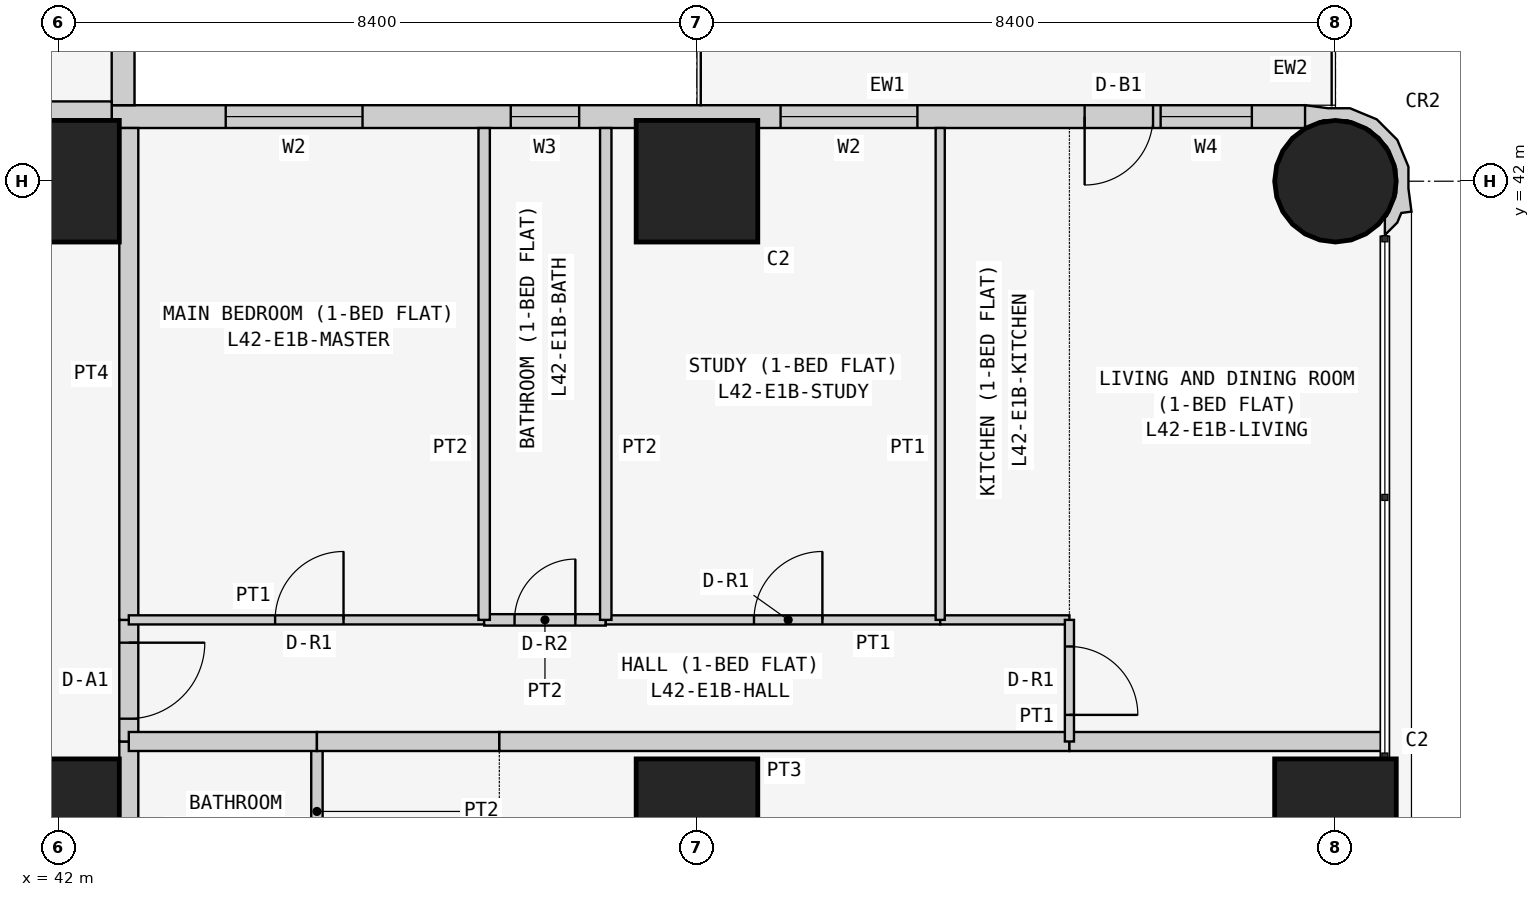
"""IFC4 building model, lengths in metres.
Left out: names, types, materials, properties, quantities, classifications, styles, units other than length and angle.
Written with IfcOpenShell. Run it as: python <this file> out.ifc"""

import sys

from ifc_helpers import new_model, si_unit, direction, frame, frame_2d, origin, origin_2d, place, context, subcontext, project, spatial, polyline, rectangle, circle, outline, extrude, element, fill, save


model = new_model("IFC4")
c1 = context("Model", 3, precision=1e-05, world=origin(), true_north=direction((0.0, 1.0)))
c2 = subcontext(c1, "Body", "Model", "MODEL_VIEW")
j1 = project(units=[si_unit("LENGTHUNIT", "METRE"), si_unit("PLANEANGLEUNIT", "RADIAN")], contexts=[c1])
p1 = place(None, origin())
s1 = spatial("IfcSite", under=j1, at=p1, CompositionType="ELEMENT")
p2 = place(p1, origin())
s2 = spatial("IfcBuilding", under=s1, at=p2, CompositionType="ELEMENT")
p3 = place(p2, frame((0.0, 0.0, 162.9)))
s3 = spatial("IfcBuildingStorey", under=s2, at=p3, CompositionType="ELEMENT", Elevation=162.9)
for number, where, z_axis, x_axis in (
    (1, (42.0, 33.6, 0.0), (0.0, 0.0, 1.0), (1.0, 0.0, 0.0)),
    (2, (42.0, 42.0, 0.0), (0.0, 0.0, 1.0), (1.0, 0.0, 0.0)),
    (3, (50.4, 33.6, 0.0), (0.0, 0.0, 1.0), (1.0, 0.0, 0.0)),
    (4, (50.4, 42.0, 0.0), (0.0, 0.0, 1.0), (1.0, 0.0, 0.0)),
    (5, (58.8, 33.6, 0.0), (0.0, 0.0, 1.0), (1.0, 0.0, 0.0)),
):
    element("IfcColumn", number, at=place(p3, frame(where, z_axis=z_axis, x_axis=x_axis)), inside=s3, PredefinedType="COLUMN", context=c2, shape_type="SweptSolid", body=[
        extrude(rectangle(XDim=1.6, YDim=1.6, at=origin_2d()), origin(), (0.0, 0.0, 1.0), 3.6),
    ])
p4 = place(p3, frame((58.8, 42.0, 0.0), z_axis=(0.0, 0.0, 1.0), x_axis=(1.0, 0.0, 0.0)))
e6 = element("IfcColumn", 6, at=p4, inside=s3, PredefinedType="COLUMN", context=c2, shape_type="SweptSolid", body=[
    extrude(circle(Radius=0.8, at=origin_2d()), origin(), (0.0, 0.0, 1.0), 3.6),
])
p5 = place(p3, frame((58.4, 42.85, 0.0), z_axis=(0.0, 0.0, 1.0), x_axis=(-1.0, 0.0, 0.0)))
e7 = element("IfcWall", 7, at=p5, inside=s3, PredefinedType="SOLIDWALL", context=c2, shape_type="SweptSolid", body=[
    extrude(rectangle(XDim=15.7, YDim=0.3, at=frame_2d((7.85, 0.0))), origin(), (0.0, 0.0, 1.0), 3.45),
])
p6 = place(p5, frame((12.4, 0.0, 0.9)))
e8 = element("IfcOpeningElement", 8, at=p6, cuts=e7, PredefinedType="OPENING", context=c2, shape_type="SweptSolid", body=[
    extrude(rectangle(XDim=1.8, YDim=1.5, at=frame_2d((0.9, 0.75))), frame((0.0, 0.16, 0.0), z_axis=(0.0, -1.0, 0.0), x_axis=(1.0, 0.0, 0.0)), (0.0, 0.0, 1.0), 0.32),
])
p7 = place(p5, frame((9.55, 0.0, 1.5)))
e9 = element("IfcOpeningElement", 9, at=p7, cuts=e7, PredefinedType="OPENING", context=c2, shape_type="SweptSolid", body=[
    extrude(rectangle(XDim=0.9, YDim=0.7, at=frame_2d((0.45, 0.35))), frame((0.0, 0.16, 0.0), z_axis=(0.0, -1.0, 0.0), x_axis=(1.0, 0.0, 0.0)), (0.0, 0.0, 1.0), 0.32),
])
p8 = place(p5, frame((5.1, 0.0, 0.9)))
e10 = element("IfcOpeningElement", 10, at=p8, cuts=e7, PredefinedType="OPENING", context=c2, shape_type="SweptSolid", body=[
    extrude(rectangle(XDim=1.8, YDim=1.5, at=frame_2d((0.9, 0.75))), frame((0.0, 0.16, 0.0), z_axis=(0.0, -1.0, 0.0), x_axis=(1.0, 0.0, 0.0)), (0.0, 0.0, 1.0), 0.32),
])
p9 = place(p5, frame((2.0, 0.0, 0.0)))
e11 = element("IfcOpeningElement", 11, at=p9, cuts=e7, PredefinedType="OPENING", context=c2, shape_type="SweptSolid", body=[
    extrude(rectangle(XDim=0.9, YDim=2.4, at=frame_2d((0.45, 1.2))), frame((0.0, 0.16, 0.0), z_axis=(0.0, -1.0, 0.0), x_axis=(1.0, 0.0, 0.0)), (0.0, 0.0, 1.0), 0.32),
])
p10 = place(p5, frame((0.7, 0.0, 0.9)))
e12 = element("IfcOpeningElement", 12, at=p10, cuts=e7, PredefinedType="OPENING", context=c2, shape_type="SweptSolid", body=[
    extrude(rectangle(XDim=1.2, YDim=1.5, at=frame_2d((0.6, 0.75))), frame((0.0, 0.16, 0.0), z_axis=(0.0, -1.0, 0.0), x_axis=(1.0, 0.0, 0.0)), (0.0, 0.0, 1.0), 0.32),
])
p11 = place(p3, frame((42.85, 43.0, 0.0), z_axis=(0.0, 0.0, 1.0), x_axis=(0.0, 1.0, 0.0)))
e13 = element("IfcWall", 13, at=p11, inside=s3, PredefinedType="SOLIDWALL", context=c2, shape_type="SweptSolid", body=[
    extrude(rectangle(XDim=7.0, YDim=0.3, at=frame_2d((3.5, 0.0))), origin(), (0.0, 0.0, 1.0), 3.45),
])
p12 = place(p11, frame((1.5, 0.0, 0.9)))
e14 = element("IfcOpeningElement", 14, at=p12, cuts=e13, PredefinedType="OPENING", context=c2, shape_type="SweptSolid", body=[
    extrude(rectangle(XDim=2.4, YDim=1.5, at=frame_2d((1.2, 0.75))), frame((0.0, 0.16, 0.0), z_axis=(0.0, -1.0, 0.0), x_axis=(1.0, 0.0, 0.0)), (0.0, 0.0, 1.0), 0.32),
])
p13 = place(p11, frame((5.05, 0.0, 0.9)))
e15 = element("IfcOpeningElement", 15, at=p13, cuts=e13, PredefinedType="OPENING", context=c2, shape_type="SweptSolid", body=[
    extrude(rectangle(XDim=1.2, YDim=1.5, at=frame_2d((0.6, 0.75))), frame((0.0, 0.16, 0.0), z_axis=(0.0, -1.0, 0.0), x_axis=(1.0, 0.0, 0.0)), (0.0, 0.0, 1.0), 0.32),
])
p14 = place(p3, frame((59.395, 41.352, 0.0), z_axis=(0.0, 0.0, 1.0), x_axis=(0.93923434088, 0.343276641956, 0.0)))
e16 = element("IfcWall", 16, at=p14, inside=s3, PredefinedType="SOLIDWALL", context=c2, shape_type="SweptSolid", body=[
    extrude(outline(polyline([(0.532, 0.393), (0.631, 0.663), (0.614, 1.044), (0.453, 1.391), (0.172, 1.649), (-0.097, 1.748), (-0.369, 1.89), (-0.509, 1.621), (-0.491, 1.615), (-0.479, 1.609), (-0.211, 1.62), (0.088, 1.511), (0.323, 1.295), (0.457, 1.006), (0.47, 0.688), (0.361, 0.389), (0.145, 0.154), (0.108, 0.136), (0.031, -0.075), (0.241, 0.023), (0.333, 0.124), (0.465, 0.094), (0.532, 0.393)])), origin(), (0.0, 0.0, 1.0), 3.45),
])
p15 = place(p3, frame((35.829, 42.925, 0.0), z_axis=(0.0, 0.0, 1.0), x_axis=(1.0, 0.0, 0.0)))
e17 = element("IfcWall", 17, at=p15, inside=s3, PredefinedType="PARTITIONING", context=c2, shape_type="SweptSolid", body=[
    extrude(rectangle(XDim=6.871, YDim=0.25, at=frame_2d((3.436, 0.0))), origin(), (0.0, 0.0, 1.0), 3.45),
])
p16 = place(p3, frame((42.925, 34.629, 0.0), z_axis=(0.0, 0.0, 1.0), x_axis=(0.0, -1.0, 0.0)))
e18 = element("IfcWall", 18, at=p16, inside=s3, PredefinedType="PARTITIONING", context=c2, shape_type="SweptSolid", body=[
    extrude(rectangle(XDim=2.629, YDim=0.25, at=frame_2d((1.314, 0.0))), origin(), (0.0, 0.0, 1.0), 3.45),
])
p17 = place(p3, frame((42.925, 36.229, 0.0), z_axis=(0.0, 0.0, 1.0), x_axis=(0.0, -1.0, 0.0)))
e19 = element("IfcWall", 19, at=p17, inside=s3, PredefinedType="PARTITIONING", context=c2, shape_type="SweptSolid", body=[
    extrude(rectangle(XDim=1.6, YDim=0.25, at=frame_2d((0.8, 0.0))), origin(), (0.0, 0.0, 1.0), 3.45),
])
p18 = place(p17, frame((0.3, 0.0, 0.0)))
e20 = element("IfcOpeningElement", 20, at=p18, cuts=e19, PredefinedType="OPENING", context=c2, shape_type="SweptSolid", body=[
    extrude(rectangle(XDim=1.0, YDim=2.1, at=frame_2d((0.5, 1.05))), frame((0.0, 0.135, 0.0), z_axis=(0.0, -1.0, 0.0), x_axis=(1.0, 0.0, 0.0)), (0.0, 0.0, 1.0), 0.27),
])
p19 = place(p3, frame((42.925, 42.7, 0.0), z_axis=(0.0, 0.0, 1.0), x_axis=(0.0, -1.0, 0.0)))
e21 = element("IfcWall", 21, at=p19, inside=s3, PredefinedType="PARTITIONING", context=c2, shape_type="SweptSolid", body=[
    extrude(rectangle(XDim=6.471, YDim=0.25, at=frame_2d((3.235, 0.0))), origin(), (0.0, 0.0, 1.0), 3.45),
])
p20 = place(p3, frame((45.4, 32.0, 0.0), z_axis=(0.0, 0.0, 1.0), x_axis=(0.0, 1.0, 0.0)))
e22 = element("IfcWall", 22, at=p20, inside=s3, PredefinedType="PARTITIONING", context=c2, shape_type="SweptSolid", body=[
    extrude(rectangle(XDim=2.629, YDim=0.15, at=frame_2d((1.314, 0.0))), origin(), (0.0, 0.0, 1.0), 3.45),
])
p21 = place(p3, frame((45.4, 34.629, 0.0), z_axis=(0.0, 0.0, 1.0), x_axis=(-1.0, 0.0, 0.0)))
e23 = element("IfcWall", 23, at=p21, inside=s3, PredefinedType="PARTITIONING", context=c2, shape_type="SweptSolid", body=[
    extrude(rectangle(XDim=2.475, YDim=0.25, at=frame_2d((1.237, 0.0))), origin(), (0.0, 0.0, 1.0), 3.45),
])
p22 = place(p3, frame((47.8, 34.629, 0.0), z_axis=(0.0, 0.0, 1.0), x_axis=(-1.0, 0.0, 0.0)))
e24 = element("IfcWall", 24, at=p22, inside=s3, PredefinedType="PARTITIONING", context=c2, shape_type="SweptSolid", body=[
    extrude(rectangle(XDim=2.4, YDim=0.25, at=frame_2d((1.2, 0.0))), origin(), (0.0, 0.0, 1.0), 3.45),
])
p23 = place(p3, frame((55.3, 34.629, 0.0), z_axis=(0.0, 0.0, 1.0), x_axis=(-1.0, 0.0, 0.0)))
e25 = element("IfcWall", 25, at=p23, inside=s3, PredefinedType="PARTITIONING", context=c2, shape_type="SweptSolid", body=[
    extrude(rectangle(XDim=7.5, YDim=0.25, at=frame_2d((3.75, 0.0))), origin(), (0.0, 0.0, 1.0), 3.45),
])
p24 = place(p3, frame((59.45, 34.629, 0.0), z_axis=(0.0, 0.0, 1.0), x_axis=(-1.0, 0.0, 0.0)))
e26 = element("IfcWall", 26, at=p24, inside=s3, PredefinedType="PARTITIONING", context=c2, shape_type="SweptSolid", body=[
    extrude(rectangle(XDim=4.15, YDim=0.25, at=frame_2d((2.075, 0.0))), origin(), (0.0, 0.0, 1.0), 3.45),
])
p25 = place(p3, frame((47.6, 36.229, 0.0), z_axis=(0.0, 0.0, 1.0), x_axis=(-1.0, 0.0, 0.0)))
e27 = element("IfcWall", 27, at=p25, inside=s3, PredefinedType="PARTITIONING", context=c2, shape_type="SweptSolid", body=[
    extrude(rectangle(XDim=4.675, YDim=0.12, at=frame_2d((2.337, 0.0))), origin(), (0.0, 0.0, 1.0), 3.45),
])
p26 = place(p25, frame((1.85, 0.0, 0.0)))
e28 = element("IfcOpeningElement", 28, at=p26, cuts=e27, PredefinedType="OPENING", context=c2, shape_type="SweptSolid", body=[
    extrude(rectangle(XDim=0.9, YDim=2.1, at=frame_2d((0.45, 1.05))), frame((0.0, 0.07, 0.0), z_axis=(0.0, -1.0, 0.0), x_axis=(1.0, 0.0, 0.0)), (0.0, 0.0, 1.0), 0.14),
])
p27 = place(p3, frame((49.2, 36.229, 0.0), z_axis=(0.0, 0.0, 1.0), x_axis=(-1.0, 0.0, 0.0)))
e29 = element("IfcWall", 29, at=p27, inside=s3, PredefinedType="PARTITIONING", context=c2, shape_type="SweptSolid", body=[
    extrude(rectangle(XDim=1.6, YDim=0.15, at=frame_2d((0.8, 0.0))), origin(), (0.0, 0.0, 1.0), 3.45),
])
p28 = place(p27, frame((0.4, 0.0, 0.0)))
e30 = element("IfcOpeningElement", 30, at=p28, cuts=e29, PredefinedType="OPENING", context=c2, shape_type="SweptSolid", body=[
    extrude(rectangle(XDim=0.8, YDim=2.1, at=frame_2d((0.4, 1.05))), frame((0.0, 0.085, 0.0), z_axis=(0.0, -1.0, 0.0), x_axis=(1.0, 0.0, 0.0)), (0.0, 0.0, 1.0), 0.17),
])
p29 = place(p3, frame((53.6, 36.229, 0.0), z_axis=(0.0, 0.0, 1.0), x_axis=(-1.0, 0.0, 0.0)))
e31 = element("IfcWall", 31, at=p29, inside=s3, PredefinedType="PARTITIONING", context=c2, shape_type="SweptSolid", body=[
    extrude(rectangle(XDim=4.4, YDim=0.12, at=frame_2d((2.2, 0.0))), origin(), (0.0, 0.0, 1.0), 3.45),
])
p30 = place(p29, frame((1.55, 0.0, 0.0)))
e32 = element("IfcOpeningElement", 32, at=p30, cuts=e31, PredefinedType="OPENING", context=c2, shape_type="SweptSolid", body=[
    extrude(rectangle(XDim=0.9, YDim=2.1, at=frame_2d((0.45, 1.05))), frame((0.0, 0.07, 0.0), z_axis=(0.0, -1.0, 0.0), x_axis=(1.0, 0.0, 0.0)), (0.0, 0.0, 1.0), 0.14),
])
p31 = place(p3, frame((55.3, 36.229, 0.0), z_axis=(0.0, 0.0, 1.0), x_axis=(-1.0, 0.0, 0.0)))
e33 = element("IfcWall", 33, at=p31, inside=s3, PredefinedType="PARTITIONING", context=c2, shape_type="SweptSolid", body=[
    extrude(rectangle(XDim=1.7, YDim=0.12, at=frame_2d((0.85, 0.0))), origin(), (0.0, 0.0, 1.0), 3.45),
])
p32 = place(p3, frame((55.3, 34.629, 0.0), z_axis=(0.0, 0.0, 1.0), x_axis=(0.0, 1.0, 0.0)))
e34 = element("IfcWall", 34, at=p32, inside=s3, PredefinedType="PARTITIONING", context=c2, shape_type="SweptSolid", body=[
    extrude(rectangle(XDim=1.6, YDim=0.12, at=frame_2d((0.8, 0.0))), origin(), (0.0, 0.0, 1.0), 3.45),
])
p33 = place(p32, frame((0.35, 0.0, 0.0)))
e35 = element("IfcOpeningElement", 35, at=p33, cuts=e34, PredefinedType="OPENING", context=c2, shape_type="SweptSolid", body=[
    extrude(rectangle(XDim=0.9, YDim=2.1, at=frame_2d((0.45, 1.05))), frame((0.0, 0.07, 0.0), z_axis=(0.0, -1.0, 0.0), x_axis=(1.0, 0.0, 0.0)), (0.0, 0.0, 1.0), 0.14),
])
for number, where, z_axis, x_axis in (
    (36, (47.6, 36.229, 0.0), (0.0, 0.0, 1.0), (0.0, 1.0, 0.0)),
    (37, (49.2, 36.229, 0.0), (0.0, 0.0, 1.0), (0.0, 1.0, 0.0)),
):
    element("IfcWall", number, at=place(p3, frame(where, z_axis=z_axis, x_axis=x_axis)), inside=s3, PredefinedType="PARTITIONING", context=c2, shape_type="SweptSolid", body=[
        extrude(rectangle(XDim=6.471, YDim=0.15, at=frame_2d((3.235, 0.0))), origin(), (0.0, 0.0, 1.0), 3.45),
    ])
p34 = place(p3, frame((53.6, 36.229, 0.0), z_axis=(0.0, 0.0, 1.0), x_axis=(0.0, 1.0, 0.0)))
e38 = element("IfcWall", 38, at=p34, inside=s3, PredefinedType="PARTITIONING", context=c2, shape_type="SweptSolid", body=[
    extrude(rectangle(XDim=6.471, YDim=0.12, at=frame_2d((3.235, 0.0))), origin(), (0.0, 0.0, 1.0), 3.45),
])
p35 = place(p6, origin())
e39 = element("IfcWindow", 39, at=p35, inside=s3, PartitioningType="SINGLE_PANEL", PredefinedType="WINDOW", context=c2, shape_type="SweptSolid", body=[
    extrude(rectangle(XDim=1.8, YDim=1.5, at=frame_2d((0.9, 0.75))), frame((0.0, 0.03, 0.0), z_axis=(0.0, -1.0, 0.0), x_axis=(1.0, 0.0, 0.0)), (0.0, 0.0, 1.0), 0.06),
])
fill(e8, e39)
p36 = place(p7, origin())
e40 = element("IfcWindow", 40, at=p36, inside=s3, PartitioningType="SINGLE_PANEL", PredefinedType="WINDOW", context=c2, shape_type="SweptSolid", body=[
    extrude(rectangle(XDim=0.9, YDim=0.7, at=frame_2d((0.45, 0.35))), frame((0.0, 0.03, 0.0), z_axis=(0.0, -1.0, 0.0), x_axis=(1.0, 0.0, 0.0)), (0.0, 0.0, 1.0), 0.06),
])
fill(e9, e40)
p37 = place(p8, origin())
e41 = element("IfcWindow", 41, at=p37, inside=s3, PartitioningType="SINGLE_PANEL", PredefinedType="WINDOW", context=c2, shape_type="SweptSolid", body=[
    extrude(rectangle(XDim=1.8, YDim=1.5, at=frame_2d((0.9, 0.75))), frame((0.0, 0.03, 0.0), z_axis=(0.0, -1.0, 0.0), x_axis=(1.0, 0.0, 0.0)), (0.0, 0.0, 1.0), 0.06),
])
fill(e10, e41)
p38 = place(p9, origin())
e42 = element("IfcDoor", 42, at=p38, inside=s3, OperationType="SINGLE_SWING_RIGHT", PredefinedType="DOOR", context=c2, shape_type="SweptSolid", body=[
    extrude(rectangle(XDim=0.9, YDim=2.4, at=frame_2d((0.45, 1.2))), frame((0.0, 0.025, 0.0), z_axis=(0.0, -1.0, 0.0), x_axis=(1.0, 0.0, 0.0)), (0.0, 0.0, 1.0), 0.05),
])
fill(e11, e42)
p39 = place(p10, origin())
e43 = element("IfcWindow", 43, at=p39, inside=s3, PartitioningType="SINGLE_PANEL", PredefinedType="WINDOW", context=c2, shape_type="SweptSolid", body=[
    extrude(rectangle(XDim=1.2, YDim=1.5, at=frame_2d((0.6, 0.75))), frame((0.0, 0.03, 0.0), z_axis=(0.0, -1.0, 0.0), x_axis=(1.0, 0.0, 0.0)), (0.0, 0.0, 1.0), 0.06),
])
fill(e12, e43)
p40 = place(p18, origin())
e44 = element("IfcDoor", 44, at=p40, inside=s3, OperationType="SINGLE_SWING_LEFT", PredefinedType="DOOR", context=c2, shape_type="SweptSolid", body=[
    extrude(rectangle(XDim=1.0, YDim=2.1, at=frame_2d((0.5, 1.05))), frame((0.0, 0.025, 0.0), z_axis=(0.0, -1.0, 0.0), x_axis=(1.0, 0.0, 0.0)), (0.0, 0.0, 1.0), 0.05),
])
fill(e20, e44)
p41 = place(p26, frame((0.9, 0.0, 0.0), z_axis=(0.0, 0.0, 1.0), x_axis=(-1.0, 0.0, 0.0)))
e45 = element("IfcDoor", 45, at=p41, inside=s3, OperationType="SINGLE_SWING_RIGHT", PredefinedType="DOOR", context=c2, shape_type="SweptSolid", body=[
    extrude(rectangle(XDim=0.9, YDim=2.1, at=frame_2d((0.45, 1.05))), frame((0.0, 0.025, 0.0), z_axis=(0.0, -1.0, 0.0), x_axis=(1.0, 0.0, 0.0)), (0.0, 0.0, 1.0), 0.05),
])
fill(e28, e45)
p42 = place(p28, frame((0.8, 0.0, 0.0), z_axis=(0.0, 0.0, 1.0), x_axis=(-1.0, 0.0, 0.0)))
e46 = element("IfcDoor", 46, at=p42, inside=s3, OperationType="SINGLE_SWING_RIGHT", PredefinedType="DOOR", context=c2, shape_type="SweptSolid", body=[
    extrude(rectangle(XDim=0.8, YDim=2.1, at=frame_2d((0.4, 1.05))), frame((0.0, 0.025, 0.0), z_axis=(0.0, -1.0, 0.0), x_axis=(1.0, 0.0, 0.0)), (0.0, 0.0, 1.0), 0.05),
])
fill(e30, e46)
p43 = place(p30, frame((0.9, 0.0, 0.0), z_axis=(0.0, 0.0, 1.0), x_axis=(-1.0, 0.0, 0.0)))
e47 = element("IfcDoor", 47, at=p43, inside=s3, OperationType="SINGLE_SWING_RIGHT", PredefinedType="DOOR", context=c2, shape_type="SweptSolid", body=[
    extrude(rectangle(XDim=0.9, YDim=2.1, at=frame_2d((0.45, 1.05))), frame((0.0, 0.025, 0.0), z_axis=(0.0, -1.0, 0.0), x_axis=(1.0, 0.0, 0.0)), (0.0, 0.0, 1.0), 0.05),
])
fill(e32, e47)
p44 = place(p33, frame((0.9, 0.0, 0.0), z_axis=(0.0, 0.0, 1.0), x_axis=(-1.0, 0.0, 0.0)))
e48 = element("IfcDoor", 48, at=p44, inside=s3, OperationType="SINGLE_SWING_RIGHT", PredefinedType="DOOR", context=c2, shape_type="SweptSolid", body=[
    extrude(rectangle(XDim=0.9, YDim=2.1, at=frame_2d((0.45, 1.05))), frame((0.0, 0.025, 0.0), z_axis=(0.0, -1.0, 0.0), x_axis=(1.0, 0.0, 0.0)), (0.0, 0.0, 1.0), 0.05),
])
fill(e35, e48)
save(model, sys.argv[1])
